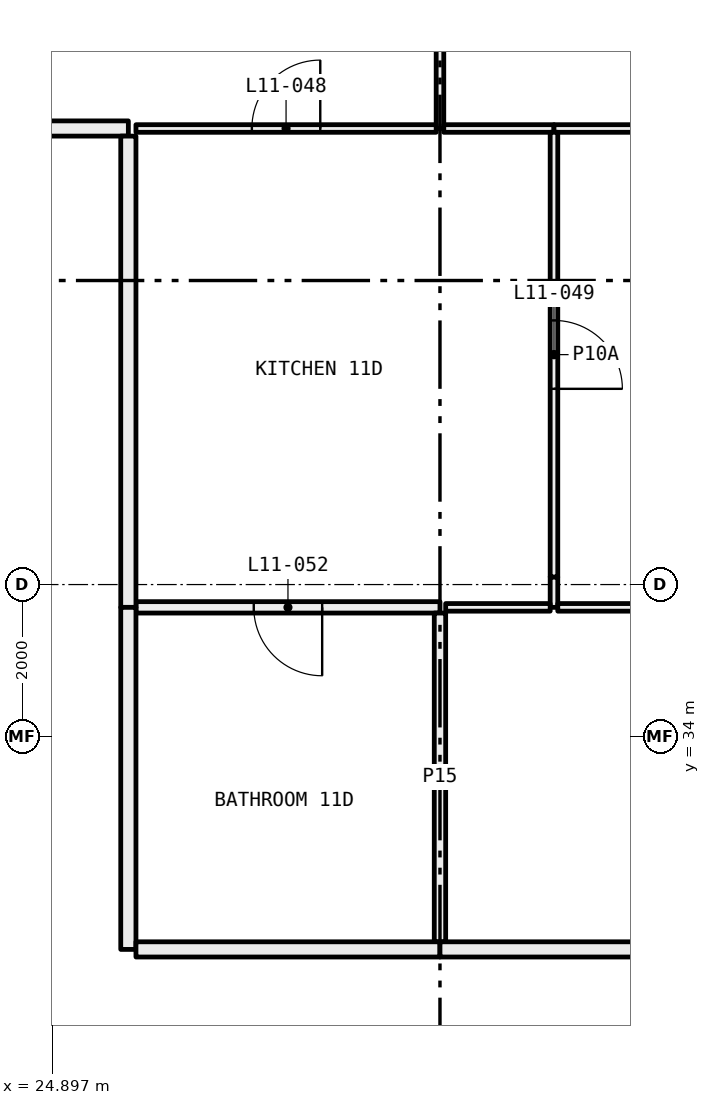
"""IFC4 building model, lengths in metres.
Left out: names, types, materials, properties, quantities, classifications, styles, units other than length and angle.
Written with IfcOpenShell. Run it as: python <this file> out.ifc"""

import sys

from ifc_helpers import new_model, si_unit, direction, frame, frame_2d, origin, place, context, subcontext, project, spatial, rectangle, extrude, element, fill, save


model = new_model("IFC4")
c1 = context("Model", 3, precision=1e-05, world=origin(), true_north=direction((0.0, 1.0)))
c2 = subcontext(c1, "Body", "Model", "MODEL_VIEW")
j1 = project(units=[si_unit("LENGTHUNIT", "METRE"), si_unit("PLANEANGLEUNIT", "RADIAN")], contexts=[c1])
p1 = place(None, origin())
s1 = spatial("IfcSite", under=j1, at=p1, CompositionType="ELEMENT")
p2 = place(p1, origin())
s2 = spatial("IfcBuilding", under=s1, at=p2, CompositionType="ELEMENT")
p3 = place(p2, frame((0.0, 0.0, 50.7)))
s3 = spatial("IfcBuildingStorey", under=s2, at=p3, CompositionType="ELEMENT", Elevation=50.7)
p4 = place(p3, frame((30.0, 42.0, 0.0), z_axis=(0.0, 0.0, 1.0), x_axis=(0.0, 1.0, 0.0)))
e1 = element("IfcWall", 1, at=p4, inside=s3, PredefinedType="PARTITIONING", context=c2, shape_type="SweptSolid", body=[
    extrude(rectangle(XDim=5.28, YDim=0.1, at=frame_2d((2.64, 0.0))), origin(), (0.0, 0.0, 1.0), 3.05),
])
p5 = place(p4, frame((2.19, 0.0, 0.0)))
e2 = element("IfcOpeningElement", 2, at=p5, cuts=e1, PredefinedType="OPENING", context=c2, shape_type="SweptSolid", body=[
    extrude(rectangle(XDim=0.9, YDim=2.1, at=frame_2d((0.45, 1.05))), frame((0.0, 0.06, 0.0), z_axis=(0.0, -1.0, 0.0), x_axis=(1.0, 0.0, 0.0)), (0.0, 0.0, 1.0), 0.12),
])
p6 = place(p3, frame((26.0, 42.0, 0.0), z_axis=(0.0, 0.0, 1.0), x_axis=(1.0, 0.0, 0.0)))
e3 = element("IfcWall", 3, at=p6, inside=s3, PredefinedType="PARTITIONING", context=c2, shape_type="SweptSolid", body=[
    extrude(rectangle(XDim=3.95, YDim=0.1, at=frame_2d((1.975, 0.0))), origin(), (0.0, 0.0, 1.0), 3.05),
])
p7 = place(p6, frame((1.525, 0.0, 0.0)))
e4 = element("IfcOpeningElement", 4, at=p7, cuts=e3, PredefinedType="OPENING", context=c2, shape_type="SweptSolid", body=[
    extrude(rectangle(XDim=0.9, YDim=2.1, at=frame_2d((0.45, 1.05))), frame((0.0, 0.06, 0.0), z_axis=(0.0, -1.0, 0.0), x_axis=(1.0, 0.0, 0.0)), (0.0, 0.0, 1.0), 0.12),
])
p8 = place(p3, frame((24.0, 42.0, 0.0), z_axis=(0.0, 0.0, 1.0), x_axis=(1.0, 0.0, 0.0)))
e5 = element("IfcWall", 5, at=p8, inside=s3, PredefinedType="PARTITIONING", context=c2, shape_type="SweptSolid", body=[
    extrude(rectangle(XDim=1.9, YDim=0.2, at=frame_2d((0.95, 0.0))), origin(), (0.0, 0.0, 1.0), 3.05),
])
p9 = place(p3, frame((30.05, 42.0, 0.0), z_axis=(0.0, 0.0, 1.0), x_axis=(1.0, 0.0, 0.0)))
e6 = element("IfcWall", 6, at=p9, inside=s3, PredefinedType="PARTITIONING", context=c2, shape_type="SweptSolid", body=[
    extrude(rectangle(XDim=1.45, YDim=0.1, at=frame_2d((0.725, 0.0))), origin(), (0.0, 0.0, 1.0), 3.05),
])
p10 = place(p3, frame((31.5, 42.0, 0.0), z_axis=(0.0, 0.0, 1.0), x_axis=(1.0, 0.0, 0.0)))
e7 = element("IfcWall", 7, at=p10, inside=s3, PredefinedType="PARTITIONING", context=c2, shape_type="SweptSolid", body=[
    extrude(rectangle(XDim=4.425, YDim=0.1, at=frame_2d((2.212, 0.0))), origin(), (0.0, 0.0, 1.0), 2.45),
])
p11 = place(p3, frame((31.5, 35.7, 0.0), z_axis=(0.0, 0.0, 1.0), x_axis=(0.0, 1.0, 0.0)))
e8 = element("IfcWall", 8, at=p11, inside=s3, PredefinedType="PARTITIONING", context=c2, shape_type="SweptSolid", body=[
    extrude(rectangle(XDim=0.4, YDim=0.1, at=frame_2d((0.2, 0.0))), origin(), (0.0, 0.0, 1.0), 2.45),
])
p12 = place(p3, frame((31.5, 36.1, 0.0), z_axis=(0.0, 0.0, 1.0), x_axis=(0.0, 1.0, 0.0)))
e9 = element("IfcWall", 9, at=p12, inside=s3, PredefinedType="PARTITIONING", context=c2, shape_type="SweptSolid", body=[
    extrude(rectangle(XDim=5.85, YDim=0.1, at=frame_2d((2.925, 0.0))), origin(), (0.0, 0.0, 1.0), 3.05),
])
p13 = place(p12, frame((2.475, 0.0, 0.0)))
e10 = element("IfcOpeningElement", 10, at=p13, cuts=e9, PredefinedType="OPENING", context=c2, shape_type="SweptSolid", body=[
    extrude(rectangle(XDim=0.9, YDim=2.1, at=frame_2d((0.45, 1.05))), frame((0.0, 0.06, 0.0), z_axis=(0.0, -1.0, 0.0), x_axis=(1.0, 0.0, 0.0)), (0.0, 0.0, 1.0), 0.12),
])
p14 = place(p3, frame((26.0, 35.7, 0.0), z_axis=(0.0, 0.0, 1.0), x_axis=(1.0, 0.0, 0.0)))
e11 = element("IfcWall", 11, at=p14, inside=s3, PredefinedType="PARTITIONING", context=c2, shape_type="SweptSolid", body=[
    extrude(rectangle(XDim=4.0, YDim=0.15, at=frame_2d((2.0, 0.0))), origin(), (0.0, 0.0, 1.0), 3.05),
])
p15 = place(p14, frame((1.55, 0.0, 0.0)))
e12 = element("IfcOpeningElement", 12, at=p15, cuts=e11, PredefinedType="OPENING", context=c2, shape_type="SweptSolid", body=[
    extrude(rectangle(XDim=0.9, YDim=2.1, at=frame_2d((0.45, 1.05))), frame((0.0, 0.085, 0.0), z_axis=(0.0, -1.0, 0.0), x_axis=(1.0, 0.0, 0.0)), (0.0, 0.0, 1.0), 0.17),
])
p16 = place(p3, frame((30.075, 35.7, 0.0), z_axis=(0.0, 0.0, 1.0), x_axis=(1.0, 0.0, 0.0)))
e13 = element("IfcWall", 13, at=p16, inside=s3, PredefinedType="PARTITIONING", context=c2, shape_type="SweptSolid", body=[
    extrude(rectangle(XDim=1.375, YDim=0.1, at=frame_2d((0.688, 0.0))), origin(), (0.0, 0.0, 1.0), 3.05),
])
p17 = place(p3, frame((25.9, 41.9, 0.0), z_axis=(0.0, 0.0, 1.0), x_axis=(0.0, -1.0, 0.0)))
e14 = element("IfcWall", 14, at=p17, inside=s3, PredefinedType="PARTITIONING", context=c2, shape_type="SweptSolid", body=[
    extrude(rectangle(XDim=6.2, YDim=0.2, at=frame_2d((3.1, 0.0))), origin(), (0.0, 0.0, 1.0), 2.45),
])
p18 = place(p3, frame((31.55, 35.7, 0.0), z_axis=(0.0, 0.0, 1.0), x_axis=(1.0, 0.0, 0.0)))
e15 = element("IfcWall", 15, at=p18, inside=s3, PredefinedType="PARTITIONING", context=c2, shape_type="SweptSolid", body=[
    extrude(rectangle(XDim=3.65, YDim=0.1, at=frame_2d((1.825, 0.0))), origin(), (0.0, 0.0, 1.0), 3.05),
])
p19 = place(p18, frame((1.375, 0.0, 0.0)))
e16 = element("IfcOpeningElement", 16, at=p19, cuts=e15, PredefinedType="OPENING", context=c2, shape_type="SweptSolid", body=[
    extrude(rectangle(XDim=0.9, YDim=2.1, at=frame_2d((0.45, 1.05))), frame((0.0, 0.06, 0.0), z_axis=(0.0, -1.0, 0.0), x_axis=(1.0, 0.0, 0.0)), (0.0, 0.0, 1.0), 0.12),
])
p20 = place(p3, frame((30.0, 31.3, 0.0), z_axis=(0.0, 0.0, 1.0), x_axis=(0.0, 1.0, 0.0)))
e17 = element("IfcWall", 17, at=p20, inside=s3, PredefinedType="PARTITIONING", context=c2, shape_type="SweptSolid", body=[
    extrude(rectangle(XDim=4.325, YDim=0.15, at=frame_2d((2.163, 0.0))), origin(), (0.0, 0.0, 1.0), 3.05),
])
p21 = place(p3, frame((25.9, 35.7, 0.0), z_axis=(0.0, 0.0, 1.0), x_axis=(0.0, -1.0, 0.0)))
e18 = element("IfcWall", 18, at=p21, inside=s3, PredefinedType="PARTITIONING", context=c2, shape_type="SweptSolid", body=[
    extrude(rectangle(XDim=4.5, YDim=0.2, at=frame_2d((2.25, 0.0))), origin(), (0.0, 0.0, 1.0), 3.05),
])
p22 = place(p3, frame((26.0, 31.2, 0.0), z_axis=(0.0, 0.0, 1.0), x_axis=(1.0, 0.0, 0.0)))
e19 = element("IfcWall", 19, at=p22, inside=s3, PredefinedType="PARTITIONING", context=c2, shape_type="SweptSolid", body=[
    extrude(rectangle(XDim=4.0, YDim=0.2, at=frame_2d((2.0, 0.0))), origin(), (0.0, 0.0, 1.0), 3.05),
])
p23 = place(p3, frame((30.0, 31.2, 0.0), z_axis=(0.0, 0.0, 1.0), x_axis=(1.0, 0.0, 0.0)))
e20 = element("IfcWall", 20, at=p23, inside=s3, PredefinedType="PARTITIONING", context=c2, shape_type="SweptSolid", body=[
    extrude(rectangle(XDim=6.1, YDim=0.2, at=frame_2d((3.05, 0.0))), origin(), (0.0, 0.0, 1.0), 2.45),
])
p24 = place(p7, origin())
e21 = element("IfcDoor", 21, at=p24, inside=s3, OperationType="SINGLE_SWING_LEFT", PredefinedType="DOOR", context=c2, shape_type="SweptSolid", body=[
    extrude(rectangle(XDim=0.9, YDim=2.1, at=frame_2d((0.45, 1.05))), frame((0.0, 0.025, 0.0), z_axis=(0.0, -1.0, 0.0), x_axis=(1.0, 0.0, 0.0)), (0.0, 0.0, 1.0), 0.05),
])
fill(e4, e21)
p25 = place(p13, frame((0.9, 0.0, 0.0), x_axis=(-1.0, 0.0, 0.0)))
e22 = element("IfcDoor", 22, at=p25, inside=s3, OperationType="SINGLE_SWING_LEFT", PredefinedType="DOOR", context=c2, shape_type="SweptSolid", body=[
    extrude(rectangle(XDim=0.9, YDim=2.1, at=frame_2d((0.45, 1.05))), frame((0.0, 0.025, 0.0), z_axis=(0.0, -1.0, 0.0), x_axis=(1.0, 0.0, 0.0)), (0.0, 0.0, 1.0), 0.05),
])
fill(e10, e22)
p26 = place(p15, frame((0.9, 0.0, 0.0), x_axis=(-1.0, 0.0, 0.0)))
e23 = element("IfcDoor", 23, at=p26, inside=s3, OperationType="SINGLE_SWING_RIGHT", PredefinedType="DOOR", context=c2, shape_type="SweptSolid", body=[
    extrude(rectangle(XDim=0.9, YDim=2.1, at=frame_2d((0.45, 1.05))), frame((0.0, 0.025, 0.0), z_axis=(0.0, -1.0, 0.0), x_axis=(1.0, 0.0, 0.0)), (0.0, 0.0, 1.0), 0.05),
])
fill(e12, e23)
save(model, sys.argv[1])
